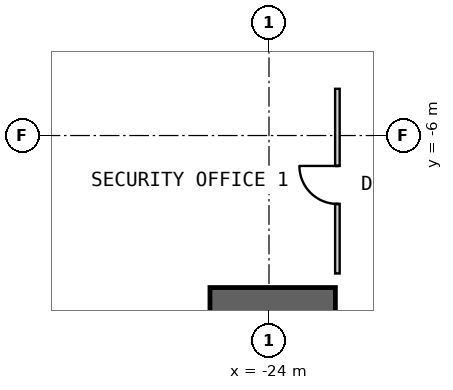
"""IFC4 building model, lengths in metres.
Left out: names, types, materials, properties, quantities, classifications, styles, units other than length and angle.
Written with IfcOpenShell. Run it as: python <this file> out.ifc"""

import sys

from ifc_helpers import new_model, si_unit, direction, frame, frame_2d, origin, place, context, subcontext, project, spatial, polyline, rectangle, outline, extrude, element, fill, save


model = new_model("IFC4")
c1 = context("Model", 3, precision=1e-05, world=origin(), true_north=direction((0.0, 1.0)))
c2 = subcontext(c1, "Body", "Model", "MODEL_VIEW")
j1 = project(units=[si_unit("LENGTHUNIT", "METRE"), si_unit("PLANEANGLEUNIT", "RADIAN")], contexts=[c1])
p1 = place(None, origin())
s1 = spatial("IfcSite", under=j1, at=p1, CompositionType="ELEMENT")
p2 = place(p1, origin())
s2 = spatial("IfcBuilding", under=s1, at=p2, CompositionType="ELEMENT")
p3 = place(p2, frame((0.0, 0.0, -5.5)))
s3 = spatial("IfcBuildingStorey", under=s2, at=p3, CompositionType="ELEMENT", Elevation=-5.5)
p4 = place(p3, origin())
e1 = element("IfcWall", 1, at=p4, inside=s3, PredefinedType="SHEAR", context=c2, shape_type="SweptSolid", body=[
    extrude(outline(polyline([(-25.553, -10.0), (-25.553, -14.0), (-22.253, -14.0), (-22.253, -10.0), (-25.553, -10.0)])), origin(), (0.0, 0.0, 1.0), 5.5),
])
p5 = place(p3, frame((-22.2, -9.63, 0.0), z_axis=(0.0, 0.0, 1.0), x_axis=(0.0, 1.0, 0.0)))
e2 = element("IfcWall", 2, at=p5, inside=s3, PredefinedType="PARTITIONING", context=c2, shape_type="SweptSolid", body=[
    extrude(rectangle(XDim=4.86, YDim=0.12, at=frame_2d((2.43, 0.0))), origin(), (0.0, 0.0, 1.0), 5.1),
])
p6 = place(p5, frame((1.83, 0.0, 0.0)))
e3 = element("IfcOpeningElement", 3, at=p6, cuts=e2, PredefinedType="OPENING", context=c2, shape_type="SweptSolid", body=[
    extrude(rectangle(XDim=1.0, YDim=2.1, at=frame_2d((0.5, 1.05))), frame((0.0, 0.07, 0.0), z_axis=(0.0, -1.0, 0.0), x_axis=(1.0, 0.0, 0.0)), (0.0, 0.0, 1.0), 0.14),
])
p7 = place(p6, origin())
e4 = element("IfcDoor", 4, at=p7, inside=s3, OperationType="SINGLE_SWING_RIGHT", PredefinedType="NOTDEFINED", context=c2, shape_type="SweptSolid", body=[
    extrude(rectangle(XDim=1.0, YDim=2.1, at=frame_2d((0.5, 1.05))), frame((0.0, 0.025, 0.0), z_axis=(0.0, -1.0, 0.0), x_axis=(1.0, 0.0, 0.0)), (0.0, 0.0, 1.0), 0.05),
])
fill(e3, e4)
save(model, sys.argv[1])
